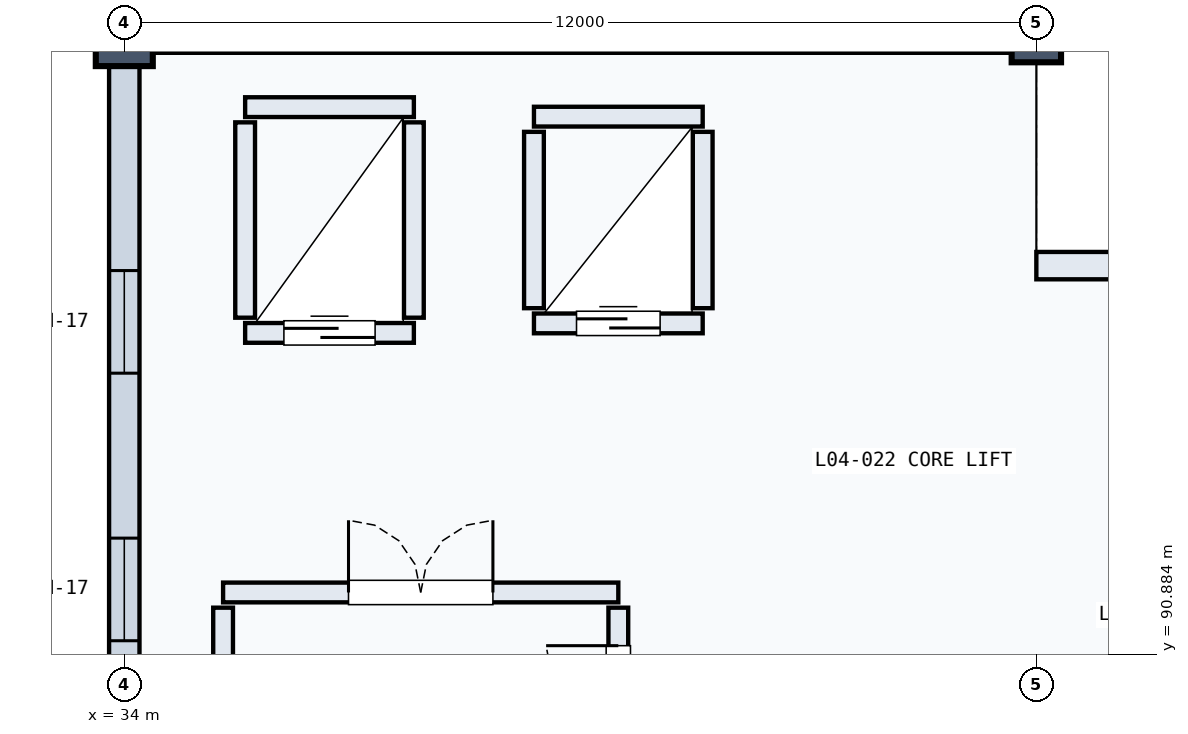
"""IFC4 building model, lengths in metres.
Left out: names, types, materials, properties, quantities, classifications, styles, units other than length and angle.
Written with IfcOpenShell. Run it as: python <this file> out.ifc"""

import sys

from ifc_helpers import new_model, si_unit, direction, frame, frame_2d, origin, origin_2d, place, context, subcontext, project, spatial, rectangle, circle, extrude, element, fill, save


model = new_model("IFC4")
c1 = context("Model", 3, precision=1e-05, world=origin(), true_north=direction((0.0, 1.0)))
c2 = subcontext(c1, "Body", "Model", "MODEL_VIEW")
j1 = project(units=[si_unit("LENGTHUNIT", "METRE"), si_unit("PLANEANGLEUNIT", "RADIAN")], contexts=[c1])
p1 = place(None, origin())
s1 = spatial("IfcSite", under=j1, at=p1, CompositionType="ELEMENT")
p2 = place(p1, origin())
s2 = spatial("IfcBuilding", under=s1, at=p2, CompositionType="ELEMENT")
p3 = place(p2, frame((0.0, 0.0, 19.5)))
s3 = spatial("IfcBuildingStorey", under=s2, at=p3, CompositionType="ELEMENT", Elevation=19.5)
p4 = place(p3, frame((34.0, 99.0, 0.0), z_axis=(0.0, 0.0, 1.0), x_axis=(1.0, 0.0, 0.0)))
e1 = element("IfcColumn", 1, at=p4, inside=s3, PredefinedType="COLUMN", context=c2, shape_type="SweptSolid", body=[
    extrude(circle(Radius=0.375, at=origin_2d()), origin(), (0.0, 0.0, 1.0), 4.8),
])
p5 = place(p3, frame((46.0, 99.0, 0.0), z_axis=(0.0, 0.0, 1.0), x_axis=(1.0, 0.0, 0.0)))
e2 = element("IfcColumn", 2, at=p5, inside=s3, PredefinedType="COLUMN", context=c2, shape_type="SweptSolid", body=[
    extrude(circle(Radius=0.325, at=origin_2d()), origin(), (0.0, 0.0, 1.0), 4.8),
])
p6 = place(p3, frame((34.22, 99.0, 0.0), z_axis=(0.0, 0.0, 1.0), x_axis=(1.0, 0.0, 0.0)))
e3 = element("IfcWall", 3, at=p6, inside=s3, PredefinedType="SOLIDWALL", context=c2, shape_type="SweptSolid", body=[
    extrude(rectangle(XDim=11.56, YDim=0.4, at=frame_2d((5.78, 0.0))), origin(), (0.0, 0.0, 1.0), 3.44),
])
p7 = place(p6, frame((3.178, 0.0, 0.8)))
e4 = element("IfcOpeningElement", 4, at=p7, cuts=e3, PredefinedType="OPENING", context=c2, shape_type="SweptSolid", body=[
    extrude(rectangle(XDim=1.35, YDim=2.1, at=frame_2d((0.675, 1.05))), frame((0.0, 0.21, 0.0), z_axis=(0.0, -1.0, 0.0), x_axis=(1.0, 0.0, 0.0)), (0.0, 0.0, 1.0), 0.42),
])
p8 = place(p6, frame((7.032, 0.0, 0.8)))
e5 = element("IfcOpeningElement", 5, at=p8, cuts=e3, PredefinedType="OPENING", context=c2, shape_type="SweptSolid", body=[
    extrude(rectangle(XDim=1.35, YDim=2.1, at=frame_2d((0.675, 1.05))), frame((0.0, 0.21, 0.0), z_axis=(0.0, -1.0, 0.0), x_axis=(1.0, 0.0, 0.0)), (0.0, 0.0, 1.0), 0.42),
])
p9 = place(p3, frame((34.0, 88.22, 0.0), z_axis=(0.0, 0.0, 1.0), x_axis=(0.0, 1.0, 0.0)))
e6 = element("IfcWall", 6, at=p9, inside=s3, PredefinedType="SOLIDWALL", context=c2, shape_type="SweptSolid", body=[
    extrude(rectangle(XDim=10.56, YDim=0.4, at=frame_2d((5.28, 0.0))), origin(), (0.0, 0.0, 1.0), 3.49),
])
p10 = place(p9, frame((2.845, 0.0, 0.8)))
e7 = element("IfcOpeningElement", 7, at=p10, cuts=e6, PredefinedType="OPENING", context=c2, shape_type="SweptSolid", body=[
    extrude(rectangle(XDim=1.35, YDim=2.1, at=frame_2d((0.675, 1.05))), frame((0.0, 0.21, 0.0), z_axis=(0.0, -1.0, 0.0), x_axis=(1.0, 0.0, 0.0)), (0.0, 0.0, 1.0), 0.42),
])
p11 = place(p9, frame((6.365, 0.0, 0.8)))
e8 = element("IfcOpeningElement", 8, at=p11, cuts=e6, PredefinedType="OPENING", context=c2, shape_type="SweptSolid", body=[
    extrude(rectangle(XDim=1.35, YDim=2.1, at=frame_2d((0.675, 1.05))), frame((0.0, 0.21, 0.0), z_axis=(0.0, -1.0, 0.0), x_axis=(1.0, 0.0, 0.0)), (0.0, 0.0, 1.0), 0.42),
])
p12 = place(p3, frame((46.0, 96.0, 0.0), z_axis=(0.0, 0.0, 1.0), x_axis=(1.0, 0.0, 0.0)))
e9 = element("IfcWall", 9, at=p12, inside=s3, PredefinedType="SOLIDWALL", context=c2, shape_type="SweptSolid", body=[
    extrude(rectangle(XDim=12.0, YDim=0.36, at=frame_2d((6.0, 0.0))), origin(), (0.0, 0.0, 1.0), 3.44),
])
p13 = place(p12, frame((2.325, 0.0, 0.8)))
e10 = element("IfcOpeningElement", 10, at=p13, cuts=e9, PredefinedType="OPENING", context=c2, shape_type="SweptSolid", body=[
    extrude(rectangle(XDim=1.35, YDim=2.1, at=frame_2d((0.675, 1.05))), frame((0.0, 0.19, 0.0), z_axis=(0.0, -1.0, 0.0), x_axis=(1.0, 0.0, 0.0)), (0.0, 0.0, 1.0), 0.38),
])
p14 = place(p12, frame((5.325, 0.0, 0.8)))
e11 = element("IfcOpeningElement", 11, at=p14, cuts=e9, PredefinedType="OPENING", context=c2, shape_type="SweptSolid", body=[
    extrude(rectangle(XDim=1.35, YDim=2.1, at=frame_2d((0.675, 1.05))), frame((0.0, 0.19, 0.0), z_axis=(0.0, -1.0, 0.0), x_axis=(1.0, 0.0, 0.0)), (0.0, 0.0, 1.0), 0.38),
])
p15 = place(p12, frame((8.325, 0.0, 0.8)))
e12 = element("IfcOpeningElement", 12, at=p15, cuts=e9, PredefinedType="OPENING", context=c2, shape_type="SweptSolid", body=[
    extrude(rectangle(XDim=1.35, YDim=2.1, at=frame_2d((0.675, 1.05))), frame((0.0, 0.19, 0.0), z_axis=(0.0, -1.0, 0.0), x_axis=(1.0, 0.0, 0.0)), (0.0, 0.0, 1.0), 0.38),
])
p16 = place(p3, frame((35.59, 95.115, 0.0), z_axis=(0.0, 0.0, 1.0), x_axis=(1.0, 0.0, 0.0)))
e13 = element("IfcWall", 13, at=p16, inside=s3, PredefinedType="SOLIDWALL", context=c2, shape_type="SweptSolid", body=[
    extrude(rectangle(XDim=2.22, YDim=0.26, at=frame_2d((1.11, 0.0))), origin(), (0.0, 0.0, 1.0), 4.46),
])
p17 = place(p16, frame((0.51, 0.0, 0.0)))
e14 = element("IfcOpeningElement", 14, at=p17, cuts=e13, PredefinedType="OPENING", context=c2, shape_type="SweptSolid", body=[
    extrude(rectangle(XDim=1.2, YDim=2.2, at=frame_2d((0.6, 1.1))), frame((0.0, 0.14, 0.0), z_axis=(0.0, -1.0, 0.0), x_axis=(1.0, 0.0, 0.0)), (0.0, 0.0, 1.0), 0.28),
])
p18 = place(p3, frame((35.59, 98.085, 0.0), z_axis=(0.0, 0.0, 1.0), x_axis=(1.0, 0.0, 0.0)))
e15 = element("IfcWall", 15, at=p18, inside=s3, PredefinedType="SOLIDWALL", context=c2, shape_type="SweptSolid", body=[
    extrude(rectangle(XDim=2.22, YDim=0.26, at=frame_2d((1.11, 0.0))), origin(), (0.0, 0.0, 1.0), 4.46),
])
for number, where, z_axis, x_axis in (
    (16, (35.59, 95.315, 0.0), (0.0, 0.0, 1.0), (0.0, 1.0, 0.0)),
    (17, (37.81, 95.315, 0.0), (0.0, 0.0, 1.0), (0.0, 1.0, 0.0)),
):
    element("IfcWall", number, at=place(p3, frame(where, z_axis=z_axis, x_axis=x_axis)), inside=s3, PredefinedType="SOLIDWALL", context=c2, shape_type="SweptSolid", body=[
        extrude(rectangle(XDim=2.57, YDim=0.26, at=frame_2d((1.285, 0.0))), origin(), (0.0, 0.0, 1.0), 4.46),
    ])
p19 = place(p3, frame((39.39, 95.24, 0.0), z_axis=(0.0, 0.0, 1.0), x_axis=(1.0, 0.0, 0.0)))
e18 = element("IfcWall", 18, at=p19, inside=s3, PredefinedType="SOLIDWALL", context=c2, shape_type="SweptSolid", body=[
    extrude(rectangle(XDim=2.22, YDim=0.26, at=frame_2d((1.11, 0.0))), origin(), (0.0, 0.0, 1.0), 4.46),
])
p20 = place(p19, frame((0.56, 0.0, 0.0)))
e19 = element("IfcOpeningElement", 19, at=p20, cuts=e18, PredefinedType="OPENING", context=c2, shape_type="SweptSolid", body=[
    extrude(rectangle(XDim=1.1, YDim=2.15, at=frame_2d((0.55, 1.075))), frame((0.0, 0.14, 0.0), z_axis=(0.0, -1.0, 0.0), x_axis=(1.0, 0.0, 0.0)), (0.0, 0.0, 1.0), 0.28),
])
p21 = place(p3, frame((39.39, 97.96, 0.0), z_axis=(0.0, 0.0, 1.0), x_axis=(1.0, 0.0, 0.0)))
e20 = element("IfcWall", 20, at=p21, inside=s3, PredefinedType="SOLIDWALL", context=c2, shape_type="SweptSolid", body=[
    extrude(rectangle(XDim=2.22, YDim=0.26, at=frame_2d((1.11, 0.0))), origin(), (0.0, 0.0, 1.0), 4.46),
])
for number, where, z_axis, x_axis in (
    (21, (39.39, 95.44, 0.0), (0.0, 0.0, 1.0), (0.0, 1.0, 0.0)),
    (22, (41.61, 95.44, 0.0), (0.0, 0.0, 1.0), (0.0, 1.0, 0.0)),
):
    element("IfcWall", number, at=place(p3, frame(where, z_axis=z_axis, x_axis=x_axis)), inside=s3, PredefinedType="SOLIDWALL", context=c2, shape_type="SweptSolid", body=[
        extrude(rectangle(XDim=2.32, YDim=0.26, at=frame_2d((1.16, 0.0))), origin(), (0.0, 0.0, 1.0), 4.46),
    ])
p22 = place(p3, frame((35.3, 91.7, 0.0), z_axis=(0.0, 0.0, 1.0), x_axis=(1.0, 0.0, 0.0)))
e23 = element("IfcWall", 23, at=p22, inside=s3, PredefinedType="SOLIDWALL", context=c2, shape_type="SweptSolid", body=[
    extrude(rectangle(XDim=5.2, YDim=0.26, at=frame_2d((2.6, 0.0))), origin(), (0.0, 0.0, 1.0), 4.46),
])
p23 = place(p22, frame((1.65, 0.0, 0.0)))
e24 = element("IfcOpeningElement", 24, at=p23, cuts=e23, PredefinedType="OPENING", context=c2, shape_type="SweptSolid", body=[
    extrude(rectangle(XDim=1.9, YDim=2.2, at=frame_2d((0.95, 1.1))), frame((0.0, 0.14, 0.0), z_axis=(0.0, -1.0, 0.0), x_axis=(1.0, 0.0, 0.0)), (0.0, 0.0, 1.0), 0.28),
])
p24 = place(p3, frame((35.3, 88.6, 0.0), z_axis=(0.0, 0.0, 1.0), x_axis=(0.0, 1.0, 0.0)))
e25 = element("IfcWall", 25, at=p24, inside=s3, PredefinedType="SOLIDWALL", context=c2, shape_type="SweptSolid", body=[
    extrude(rectangle(XDim=2.9, YDim=0.26, at=frame_2d((1.45, 0.0))), origin(), (0.0, 0.0, 1.0), 4.46),
])
p25 = place(p3, frame((40.5, 88.6, 0.0), z_axis=(0.0, 0.0, 1.0), x_axis=(0.0, 1.0, 0.0)))
e26 = element("IfcWall", 26, at=p25, inside=s3, PredefinedType="SOLIDWALL", context=c2, shape_type="SweptSolid", body=[
    extrude(rectangle(XDim=2.9, YDim=0.26, at=frame_2d((1.45, 0.0))), origin(), (0.0, 0.0, 1.0), 4.46),
])
p26 = place(p25, frame((0.5, 0.0, 0.0)))
e27 = element("IfcOpeningElement", 27, at=p26, cuts=e26, PredefinedType="OPENING", context=c2, shape_type="SweptSolid", body=[
    extrude(rectangle(XDim=1.9, YDim=2.2, at=frame_2d((0.95, 1.1))), frame((0.0, 0.14, 0.0), z_axis=(0.0, -1.0, 0.0), x_axis=(1.0, 0.0, 0.0)), (0.0, 0.0, 1.0), 0.28),
])
p27 = place(p10, origin())
e28 = element("IfcWindow", 28, at=p27, inside=s3, PartitioningType="SINGLE_PANEL", PredefinedType="WINDOW", context=c2, shape_type="SweptSolid", body=[
    extrude(rectangle(XDim=1.35, YDim=2.1, at=frame_2d((0.675, 1.05))), frame((0.0, 0.03, 0.0), z_axis=(0.0, -1.0, 0.0), x_axis=(1.0, 0.0, 0.0)), (0.0, 0.0, 1.0), 0.06),
])
fill(e7, e28)
p28 = place(p11, origin())
e29 = element("IfcWindow", 29, at=p28, inside=s3, PartitioningType="SINGLE_PANEL", PredefinedType="WINDOW", context=c2, shape_type="SweptSolid", body=[
    extrude(rectangle(XDim=1.35, YDim=2.1, at=frame_2d((0.675, 1.05))), frame((0.0, 0.03, 0.0), z_axis=(0.0, -1.0, 0.0), x_axis=(1.0, 0.0, 0.0)), (0.0, 0.0, 1.0), 0.06),
])
fill(e8, e29)
p29 = place(p17, origin())
e30 = element("IfcDoor", 30, at=p29, inside=s3, OperationType="SLIDING_TO_LEFT", PredefinedType="DOOR", context=c2, shape_type="SweptSolid", body=[
    extrude(rectangle(XDim=1.2, YDim=2.2, at=frame_2d((0.6, 1.1))), frame((0.0, 0.025, 0.0), z_axis=(0.0, -1.0, 0.0), x_axis=(1.0, 0.0, 0.0)), (0.0, 0.0, 1.0), 0.05),
])
fill(e14, e30)
p30 = place(p20, origin())
e31 = element("IfcDoor", 31, at=p30, inside=s3, OperationType="SLIDING_TO_LEFT", PredefinedType="DOOR", context=c2, shape_type="SweptSolid", body=[
    extrude(rectangle(XDim=1.1, YDim=2.15, at=frame_2d((0.55, 1.075))), frame((0.0, 0.025, 0.0), z_axis=(0.0, -1.0, 0.0), x_axis=(1.0, 0.0, 0.0)), (0.0, 0.0, 1.0), 0.05),
])
fill(e19, e31)
p31 = place(p23, origin())
e32 = element("IfcDoor", 32, at=p31, inside=s3, OperationType="DOUBLE_DOOR_SINGLE_SWING", PredefinedType="DOOR", context=c2, shape_type="SweptSolid", body=[
    extrude(rectangle(XDim=1.9, YDim=2.2, at=frame_2d((0.95, 1.1))), frame((0.0, 0.025, 0.0), z_axis=(0.0, -1.0, 0.0), x_axis=(1.0, 0.0, 0.0)), (0.0, 0.0, 1.0), 0.05),
])
fill(e24, e32)
p32 = place(p26, origin())
e33 = element("IfcDoor", 33, at=p32, inside=s3, OperationType="DOUBLE_DOOR_SINGLE_SWING", PredefinedType="DOOR", context=c2, shape_type="SweptSolid", body=[
    extrude(rectangle(XDim=1.9, YDim=2.2, at=frame_2d((0.95, 1.1))), frame((0.0, 0.025, 0.0), z_axis=(0.0, -1.0, 0.0), x_axis=(1.0, 0.0, 0.0)), (0.0, 0.0, 1.0), 0.05),
])
fill(e27, e33)
save(model, sys.argv[1])
